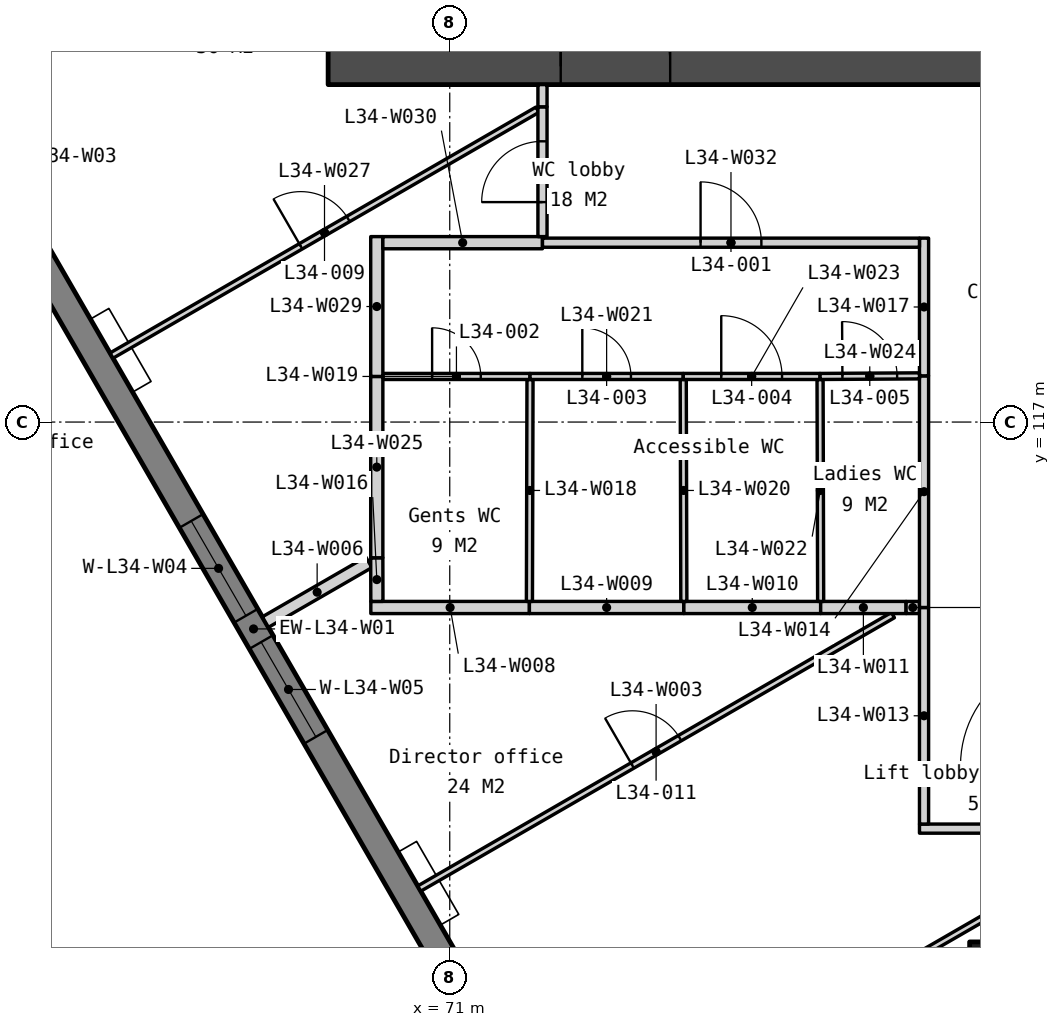
"""IFC4 building model, lengths in metres.
Left out: names, types, materials, properties, quantities, classifications, styles, units other than length and angle.
Written with IfcOpenShell. Run it as: python <this file> out.ifc"""

import sys

from ifc_helpers import new_model, si_unit, direction, frame, frame_2d, origin, origin_2d, place, context, subcontext, project, spatial, polyline, rectangle, outline, extrude, element, fill, save


model = new_model("IFC4")
c1 = context("Model", 3, precision=1e-05, world=origin(), true_north=direction((0.0, 1.0)))
c2 = subcontext(c1, "Body", "Model", "MODEL_VIEW")
j1 = project(units=[si_unit("LENGTHUNIT", "METRE"), si_unit("PLANEANGLEUNIT", "RADIAN")], contexts=[c1])
p1 = place(None, origin())
s1 = spatial("IfcSite", under=j1, at=p1, CompositionType="ELEMENT")
p2 = place(p1, origin())
s2 = spatial("IfcBuilding", under=s1, at=p2, CompositionType="ELEMENT")
p3 = place(p2, frame((0.0, 0.0, 136.4)))
s3 = spatial("IfcBuildingStorey", under=s2, at=p3, CompositionType="ELEMENT", Elevation=136.4)
p4 = place(p3, frame((80.0, 108.0, 0.0), z_axis=(0.0, 0.0, 1.0), x_axis=(1.0, 0.0, 0.0)))
e1 = element("IfcColumn", 1, at=p4, inside=s3, PredefinedType="COLUMN", context=c2, shape_type="SweptSolid", body=[
    extrude(rectangle(XDim=0.9, YDim=0.9, at=origin_2d()), origin(), (0.0, 0.0, 1.0), 3.9),
])
p5 = place(p3, frame((69.0, 122.85, 0.0), z_axis=(0.0, 0.0, 1.0), x_axis=(1.0, 0.0, 0.0)))
e2 = element("IfcWall", 2, at=p5, inside=s3, PredefinedType="SOLIDWALL", context=c2, shape_type="SweptSolid", body=[
    extrude(rectangle(XDim=22.0, YDim=0.6, at=frame_2d((11.0, 0.0))), origin(), (0.0, 0.0, 1.0), 3.75),
])
p6 = place(p5, frame((16.375, 0.0, 0.0)))
e3 = element("IfcOpeningElement", 3, at=p6, cuts=e2, PredefinedType="OPENING", context=c2, shape_type="SweptSolid", body=[
    extrude(rectangle(XDim=1.8, YDim=2.1, at=frame_2d((0.9, 1.05))), frame((0.0, 0.31, 0.0), z_axis=(0.0, -1.0, 0.0), x_axis=(1.0, 0.0, 0.0)), (0.0, 0.0, 1.0), 0.62),
])
p7 = place(p5, frame((3.825, 0.0, 0.0)))
e4 = element("IfcOpeningElement", 4, at=p7, cuts=e2, PredefinedType="OPENING", context=c2, shape_type="SweptSolid", body=[
    extrude(rectangle(XDim=1.8, YDim=2.1, at=frame_2d((0.9, 1.05))), frame((0.0, 0.31, 0.0), z_axis=(0.0, -1.0, 0.0), x_axis=(1.0, 0.0, 0.0)), (0.0, 0.0, 1.0), 0.62),
])
p8 = place(p5, frame((12.85, 0.0, 0.0)))
e5 = element("IfcOpeningElement", 5, at=p8, cuts=e2, PredefinedType="OPENING", context=c2, shape_type="SweptSolid", body=[
    extrude(rectangle(XDim=1.5, YDim=2.1, at=frame_2d((0.75, 1.05))), frame((0.0, 0.31, 0.0), z_axis=(0.0, -1.0, 0.0), x_axis=(1.0, 0.0, 0.0)), (0.0, 0.0, 1.0), 0.62),
])
p9 = place(p3, frame((57.652, 131.129, -0.15), z_axis=(0.0, 0.0, 1.0), x_axis=(0.499997369791, -0.866026922331, 0.0)))
e6 = element("IfcWall", 6, at=p9, inside=s3, PredefinedType="SOLIDWALL", context=c2, shape_type="SweptSolid", body=[
    extrude(outline(polyline([(40.486, 0.0), (40.486, 3.9), (0.0, 3.9), (0.0, 0.0), (40.486, 0.0)])), frame((0.0, 0.225, 0.0), z_axis=(0.0, -1.0, 0.0), x_axis=(1.0, 0.0, 0.0)), (0.0, 0.0, 1.0), 0.45),
])
p10 = place(p9, frame((0.87, 0.0, 0.95)))
e7 = element("IfcOpeningElement", 7, at=p10, cuts=e6, PredefinedType="OPENING", context=c2, shape_type="SweptSolid", body=[
    extrude(rectangle(XDim=1.2, YDim=2.2, at=frame_2d((0.6, 1.1))), frame((0.0, 0.235, 0.0), z_axis=(0.0, -1.0, 0.0), x_axis=(1.0, 0.0, 0.0)), (0.0, 0.0, 1.0), 0.47),
])
p11 = place(p9, frame((8.072, 0.0, 0.95)))
e8 = element("IfcOpeningElement", 8, at=p11, cuts=e6, PredefinedType="OPENING", context=c2, shape_type="SweptSolid", body=[
    extrude(rectangle(XDim=1.8, YDim=2.2, at=frame_2d((0.9, 1.1))), frame((0.0, 0.235, 0.0), z_axis=(0.0, -1.0, 0.0), x_axis=(1.0, 0.0, 0.0)), (0.0, 0.0, 1.0), 0.47),
])
p12 = place(p9, frame((10.372, 0.0, 0.95)))
e9 = element("IfcOpeningElement", 9, at=p12, cuts=e6, PredefinedType="OPENING", context=c2, shape_type="SweptSolid", body=[
    extrude(rectangle(XDim=1.8, YDim=2.2, at=frame_2d((0.9, 1.1))), frame((0.0, 0.235, 0.0), z_axis=(0.0, -1.0, 0.0), x_axis=(1.0, 0.0, 0.0)), (0.0, 0.0, 1.0), 0.47),
])
p13 = place(p9, frame((18.193, 0.0, 0.95)))
e10 = element("IfcOpeningElement", 10, at=p13, cuts=e6, PredefinedType="OPENING", context=c2, shape_type="SweptSolid", body=[
    extrude(rectangle(XDim=1.8, YDim=2.2, at=frame_2d((0.9, 1.1))), frame((0.0, 0.235, 0.0), z_axis=(0.0, -1.0, 0.0), x_axis=(1.0, 0.0, 0.0)), (0.0, 0.0, 1.0), 0.47),
])
p14 = place(p9, frame((20.493, 0.0, 0.95)))
e11 = element("IfcOpeningElement", 11, at=p14, cuts=e6, PredefinedType="OPENING", context=c2, shape_type="SweptSolid", body=[
    extrude(rectangle(XDim=1.8, YDim=2.2, at=frame_2d((0.9, 1.1))), frame((0.0, 0.235, 0.0), z_axis=(0.0, -1.0, 0.0), x_axis=(1.0, 0.0, 0.0)), (0.0, 0.0, 1.0), 0.47),
])
p15 = place(p9, frame((28.315, 0.0, 0.95)))
e12 = element("IfcOpeningElement", 12, at=p15, cuts=e6, PredefinedType="OPENING", context=c2, shape_type="SweptSolid", body=[
    extrude(rectangle(XDim=1.8, YDim=2.2, at=frame_2d((0.9, 1.1))), frame((0.0, 0.235, 0.0), z_axis=(0.0, -1.0, 0.0), x_axis=(1.0, 0.0, 0.0)), (0.0, 0.0, 1.0), 0.47),
])
p16 = place(p9, frame((30.615, 0.0, 0.95)))
e13 = element("IfcOpeningElement", 13, at=p16, cuts=e6, PredefinedType="OPENING", context=c2, shape_type="SweptSolid", body=[
    extrude(rectangle(XDim=1.8, YDim=2.2, at=frame_2d((0.9, 1.1))), frame((0.0, 0.235, 0.0), z_axis=(0.0, -1.0, 0.0), x_axis=(1.0, 0.0, 0.0)), (0.0, 0.0, 1.0), 0.47),
])
p17 = place(p9, frame((38.417, 0.0, 0.95)))
e14 = element("IfcOpeningElement", 14, at=p17, cuts=e6, PredefinedType="OPENING", context=c2, shape_type="SweptSolid", body=[
    extrude(rectangle(XDim=1.2, YDim=2.2, at=frame_2d((0.6, 1.1))), frame((0.0, 0.235, 0.0), z_axis=(0.0, -1.0, 0.0), x_axis=(1.0, 0.0, 0.0)), (0.0, 0.0, 1.0), 0.47),
])
p18 = place(p3, frame((73.029, 104.945, 0.0), z_axis=(0.0, 0.0, 1.0), x_axis=(0.866023222546, 0.500003777996, 0.0)))
e15 = element("IfcWall", 15, at=p18, inside=s3, PredefinedType="PARTITIONING", context=c2, shape_type="SweptSolid", body=[
    extrude(rectangle(XDim=7.963, YDim=0.1, at=frame_2d((3.981, 0.0))), origin(), (0.0, 0.0, 1.0), 3.75),
])
p19 = place(p3, frame((70.499, 109.327, 0.0), z_axis=(0.0, 0.0, 1.0), x_axis=(0.866019704065, 0.500009872074, 0.0)))
e16 = element("IfcWall", 16, at=p19, inside=s3, PredefinedType="PARTITIONING", context=c2, shape_type="SweptSolid", body=[
    extrude(rectangle(XDim=8.995, YDim=0.1, at=frame_2d((4.498, 0.0))), origin(), (0.0, 0.0, 1.0), 3.75),
])
p20 = place(p19, frame((4.048, 0.0, 0.0)))
e17 = element("IfcOpeningElement", 17, at=p20, cuts=e16, PredefinedType="OPENING", context=c2, shape_type="SweptSolid", body=[
    extrude(rectangle(XDim=0.9, YDim=2.1, at=frame_2d((0.45, 1.05))), frame((0.0, 0.06, 0.0), z_axis=(0.0, -1.0, 0.0), x_axis=(1.0, 0.0, 0.0)), (0.0, 0.0, 1.0), 0.12),
])
p21 = place(p3, frame((78.725, 110.313, 0.0), z_axis=(0.0, 0.0, 1.0), x_axis=(1.0, 0.0, 0.0)))
e18 = element("IfcWall", 18, at=p21, inside=s3, PredefinedType="PARTITIONING", context=c2, shape_type="SweptSolid", body=[
    extrude(rectangle(XDim=2.55, YDim=0.15, at=frame_2d((1.275, 0.0))), origin(), (0.0, 0.0, 1.0), 3.75),
])
p22 = place(p3, frame((67.968, 113.71, 0.0), z_axis=(0.0, 0.0, 1.0), x_axis=(0.866009734793, 0.500027138508, 0.0)))
e19 = element("IfcWall", 19, at=p22, inside=s3, PredefinedType="PARTITIONING", context=c2, shape_type="SweptSolid", body=[
    extrude(rectangle(XDim=1.965, YDim=0.2, at=frame_2d((0.983, 0.0))), origin(), (0.0, 0.0, 1.0), 3.75),
])
p23 = place(p3, frame((69.702, 113.95, 0.0), z_axis=(0.0, 0.0, 1.0), x_axis=(1.0, 0.0, 0.0)))
e20 = element("IfcWall", 20, at=p23, inside=s3, PredefinedType="PARTITIONING", context=c2, shape_type="SweptSolid", body=[
    extrude(rectangle(XDim=2.608, YDim=0.2, at=frame_2d((1.304, 0.0))), origin(), (0.0, 0.0, 1.0), 3.75),
])
p24 = place(p3, frame((72.31, 113.95, 0.0), z_axis=(0.0, 0.0, 1.0), x_axis=(1.0, 0.0, 0.0)))
e21 = element("IfcWall", 21, at=p24, inside=s3, PredefinedType="PARTITIONING", context=c2, shape_type="SweptSolid", body=[
    extrude(rectangle(XDim=2.54, YDim=0.2, at=frame_2d((1.27, 0.0))), origin(), (0.0, 0.0, 1.0), 3.75),
])
p25 = place(p3, frame((74.85, 113.95, 0.0), z_axis=(0.0, 0.0, 1.0), x_axis=(1.0, 0.0, 0.0)))
e22 = element("IfcWall", 22, at=p25, inside=s3, PredefinedType="PARTITIONING", context=c2, shape_type="SweptSolid", body=[
    extrude(rectangle(XDim=2.25, YDim=0.2, at=frame_2d((1.125, 0.0))), origin(), (0.0, 0.0, 1.0), 3.75),
])
p26 = place(p3, frame((77.1, 113.95, 0.0), z_axis=(0.0, 0.0, 1.0), x_axis=(1.0, 0.0, 0.0)))
e23 = element("IfcWall", 23, at=p26, inside=s3, PredefinedType="PARTITIONING", context=c2, shape_type="SweptSolid", body=[
    extrude(rectangle(XDim=1.405, YDim=0.2, at=frame_2d((0.702, 0.0))), origin(), (0.0, 0.0, 1.0), 3.75),
])
p27 = place(p3, frame((78.505, 113.95, 0.0), z_axis=(0.0, 0.0, 1.0), x_axis=(1.0, 0.0, 0.0)))
e24 = element("IfcWall", 24, at=p27, inside=s3, PredefinedType="PARTITIONING", context=c2, shape_type="SweptSolid", body=[
    extrude(rectangle(XDim=0.22, YDim=0.2, at=frame_2d((0.11, 0.0))), origin(), (0.0, 0.0, 1.0), 3.75),
])
p28 = place(p3, frame((78.8, 110.388, 0.0), z_axis=(0.0, 0.0, 1.0), x_axis=(0.0, 1.0, 0.0)))
e25 = element("IfcWall", 25, at=p28, inside=s3, PredefinedType="PARTITIONING", context=c2, shape_type="SweptSolid", body=[
    extrude(rectangle(XDim=3.562, YDim=0.15, at=frame_2d((1.781, 0.0))), origin(), (0.0, 0.0, 1.0), 3.75),
])
p29 = place(p3, frame((78.8, 113.95, 0.0), z_axis=(0.0, 0.0, 1.0), x_axis=(0.0, 1.0, 0.0)))
e26 = element("IfcWall", 26, at=p29, inside=s3, PredefinedType="PARTITIONING", context=c2, shape_type="SweptSolid", body=[
    extrude(rectangle(XDim=3.81, YDim=0.15, at=frame_2d((1.905, 0.0))), origin(), (0.0, 0.0, 1.0), 3.75),
])
p30 = place(p3, frame((69.802, 114.05, 0.0), z_axis=(0.0, 0.0, 1.0), x_axis=(-0.002380945632, 0.999997165545, 0.0)))
e27 = element("IfcWall", 27, at=p30, inside=s3, PredefinedType="PARTITIONING", context=c2, shape_type="SweptSolid", body=[
    extrude(rectangle(XDim=0.718, YDim=0.2, at=frame_2d((0.359, 0.0))), origin(), (0.0, 0.0, 1.0), 3.75),
])
p31 = place(p3, frame((78.8, 117.76, 0.0), z_axis=(0.0, 0.0, 1.0), x_axis=(0.0, 1.0, 0.0)))
e28 = element("IfcWall", 28, at=p31, inside=s3, PredefinedType="PARTITIONING", context=c2, shape_type="SweptSolid", body=[
    extrude(rectangle(XDim=2.265, YDim=0.15, at=frame_2d((1.132, 0.0))), origin(), (0.0, 0.0, 1.0), 3.75),
])
p32 = place(p3, frame((72.31, 114.05, 0.0), z_axis=(0.0, 0.0, 1.0), x_axis=(0.002608686776, 0.999996597371, 0.0)))
e29 = element("IfcWall", 29, at=p32, inside=s3, PredefinedType="PARTITIONING", context=c2, shape_type="SweptSolid", body=[
    extrude(rectangle(XDim=3.65, YDim=0.1, at=frame_2d((1.825, 0.0))), origin(), (0.0, 0.0, 1.0), 3.75),
])
p33 = place(p3, frame((69.9, 117.75, 0.0), z_axis=(0.0, 0.0, 1.0), x_axis=(1.0, 0.0, 0.0)))
e30 = element("IfcWall", 30, at=p33, inside=s3, PredefinedType="PARTITIONING", context=c2, shape_type="SweptSolid", body=[
    extrude(rectangle(XDim=2.42, YDim=0.1, at=frame_2d((1.21, 0.0))), origin(), (0.0, 0.0, 1.0), 3.75),
])
p34 = place(p33, frame((0.81, 0.0, 0.0)))
e31 = element("IfcOpeningElement", 31, at=p34, cuts=e30, PredefinedType="OPENING", context=c2, shape_type="SweptSolid", body=[
    extrude(rectangle(XDim=0.8, YDim=2.1, at=frame_2d((0.4, 1.05))), frame((0.0, 0.06, 0.0), z_axis=(0.0, -1.0, 0.0), x_axis=(1.0, 0.0, 0.0)), (0.0, 0.0, 1.0), 0.12),
])
p35 = place(p3, frame((74.85, 114.05, 0.0), z_axis=(0.0, 0.0, 1.0), x_axis=(-0.002675575707, 0.999996420641, 0.0)))
e32 = element("IfcWall", 32, at=p35, inside=s3, PredefinedType="PARTITIONING", context=c2, shape_type="SweptSolid", body=[
    extrude(rectangle(XDim=3.65, YDim=0.1, at=frame_2d((1.825, 0.0))), origin(), (0.0, 0.0, 1.0), 3.75),
])
p36 = place(p3, frame((72.32, 117.75, 0.0), z_axis=(0.0, 0.0, 1.0), x_axis=(1.0, 0.0, 0.0)))
e33 = element("IfcWall", 33, at=p36, inside=s3, PredefinedType="PARTITIONING", context=c2, shape_type="SweptSolid", body=[
    extrude(rectangle(XDim=2.52, YDim=0.1, at=frame_2d((1.26, 0.0))), origin(), (0.0, 0.0, 1.0), 3.75),
])
p37 = place(p36, frame((0.86, 0.0, 0.0)))
e34 = element("IfcOpeningElement", 34, at=p37, cuts=e33, PredefinedType="OPENING", context=c2, shape_type="SweptSolid", body=[
    extrude(rectangle(XDim=0.8, YDim=2.1, at=frame_2d((0.4, 1.05))), frame((0.0, 0.06, 0.0), z_axis=(0.0, -1.0, 0.0), x_axis=(1.0, 0.0, 0.0)), (0.0, 0.0, 1.0), 0.12),
])
p38 = place(p3, frame((77.1, 114.05, 0.0), z_axis=(0.0, 0.0, 1.0), x_axis=(-0.002675575707, 0.999996420641, 0.0)))
e35 = element("IfcWall", 35, at=p38, inside=s3, PredefinedType="PARTITIONING", context=c2, shape_type="SweptSolid", body=[
    extrude(rectangle(XDim=3.65, YDim=0.1, at=frame_2d((1.825, 0.0))), origin(), (0.0, 0.0, 1.0), 3.75),
])
p39 = place(p3, frame((74.84, 117.75, 0.0), z_axis=(0.0, 0.0, 1.0), x_axis=(1.0, 0.0, 0.0)))
e36 = element("IfcWall", 36, at=p39, inside=s3, PredefinedType="PARTITIONING", context=c2, shape_type="SweptSolid", body=[
    extrude(rectangle(XDim=2.25, YDim=0.1, at=frame_2d((1.125, 0.0))), origin(), (0.0, 0.0, 1.0), 3.75),
])
p40 = place(p39, frame((0.625, 0.0, 0.0)))
e37 = element("IfcOpeningElement", 37, at=p40, cuts=e36, PredefinedType="OPENING", context=c2, shape_type="SweptSolid", body=[
    extrude(rectangle(XDim=1.0, YDim=2.1, at=frame_2d((0.5, 1.05))), frame((0.0, 0.06, 0.0), z_axis=(0.0, -1.0, 0.0), x_axis=(1.0, 0.0, 0.0)), (0.0, 0.0, 1.0), 0.12),
])
p41 = place(p3, frame((77.09, 117.75, 0.0), z_axis=(0.0, 0.0, 1.0), x_axis=(0.999983043837, 0.005823404317, 0.0)))
e38 = element("IfcWall", 38, at=p41, inside=s3, PredefinedType="PARTITIONING", context=c2, shape_type="SweptSolid", body=[
    extrude(rectangle(XDim=1.635, YDim=0.1, at=frame_2d((0.817, 0.0))), origin(), (0.0, 0.0, 1.0), 3.75),
])
p42 = place(p41, frame((0.367, 0.0, 0.0)))
e39 = element("IfcOpeningElement", 39, at=p42, cuts=e38, PredefinedType="OPENING", context=c2, shape_type="SweptSolid", body=[
    extrude(rectangle(XDim=0.9, YDim=2.1, at=frame_2d((0.45, 1.05))), frame((0.0, 0.06, 0.0), z_axis=(0.0, -1.0, 0.0), x_axis=(1.0, 0.0, 0.0)), (0.0, 0.0, 1.0), 0.12),
])
p43 = place(p3, frame((69.8, 114.768, 0.0), z_axis=(0.0, 0.0, 1.0), x_axis=(0.0, 1.0, 0.0)))
e40 = element("IfcWall", 40, at=p43, inside=s3, PredefinedType="PARTITIONING", context=c2, shape_type="SweptSolid", body=[
    extrude(rectangle(XDim=2.982, YDim=0.2, at=frame_2d((1.491, 0.0))), origin(), (0.0, 0.0, 1.0), 3.75),
])
p44 = place(p3, frame((65.438, 118.093, 0.0), z_axis=(0.0, 0.0, 1.0), x_axis=(0.866029768103, 0.499992440702, 0.0)))
e41 = element("IfcWall", 41, at=p44, inside=s3, PredefinedType="PARTITIONING", context=c2, shape_type="SweptSolid", body=[
    extrude(rectangle(XDim=8.089, YDim=0.1, at=frame_2d((4.044, 0.0))), origin(), (0.0, 0.0, 1.0), 3.75),
])
p45 = place(p44, frame((3.594, 0.0, 0.0)))
e42 = element("IfcOpeningElement", 42, at=p45, cuts=e41, PredefinedType="OPENING", context=c2, shape_type="SweptSolid", body=[
    extrude(rectangle(XDim=0.9, YDim=2.1, at=frame_2d((0.45, 1.05))), frame((0.0, 0.06, 0.0), z_axis=(0.0, -1.0, 0.0), x_axis=(1.0, 0.0, 0.0)), (0.0, 0.0, 1.0), 0.12),
])
p46 = place(p3, frame((69.8, 117.75, 0.0), z_axis=(0.0, 0.0, 1.0), x_axis=(0.0, 1.0, 0.0)))
e43 = element("IfcWall", 43, at=p46, inside=s3, PredefinedType="PARTITIONING", context=c2, shape_type="SweptSolid", body=[
    extrude(rectangle(XDim=2.3, YDim=0.2, at=frame_2d((1.15, 0.0))), origin(), (0.0, 0.0, 1.0), 3.75),
])
p47 = place(p3, frame((69.9, 119.95, 0.0), z_axis=(0.0, 0.0, 1.0), x_axis=(1.0, 0.0, 0.0)))
e44 = element("IfcWall", 44, at=p47, inside=s3, PredefinedType="PARTITIONING", context=c2, shape_type="SweptSolid", body=[
    extrude(rectangle(XDim=2.625, YDim=0.2, at=frame_2d((1.312, 0.0))), origin(), (0.0, 0.0, 1.0), 3.75),
])
p48 = place(p3, frame((72.525, 120.05, 0.0), z_axis=(0.0, 0.0, 1.0), x_axis=(0.0, 1.0, 0.0)))
e45 = element("IfcWall", 45, at=p48, inside=s3, PredefinedType="PARTITIONING", context=c2, shape_type="SweptSolid", body=[
    extrude(rectangle(XDim=2.135, YDim=0.15, at=frame_2d((1.067, 0.0))), origin(), (0.0, 0.0, 1.0), 3.75),
])
p49 = place(p48, frame((0.567, 0.0, 0.0)))
e46 = element("IfcOpeningElement", 46, at=p49, cuts=e45, PredefinedType="OPENING", context=c2, shape_type="SweptSolid", body=[
    extrude(rectangle(XDim=1.0, YDim=2.1, at=frame_2d((0.5, 1.05))), frame((0.0, 0.085, 0.0), z_axis=(0.0, -1.0, 0.0), x_axis=(1.0, 0.0, 0.0)), (0.0, 0.0, 1.0), 0.17),
])
p50 = place(p3, frame((72.525, 119.95, 0.0), z_axis=(0.0, 0.0, 1.0), x_axis=(1.0, 0.0, 0.0)))
e47 = element("IfcWall", 47, at=p50, inside=s3, PredefinedType="PARTITIONING", context=c2, shape_type="SweptSolid", body=[
    extrude(rectangle(XDim=6.2, YDim=0.15, at=frame_2d((3.1, 0.0))), origin(), (0.0, 0.0, 1.0), 3.75),
])
p51 = place(p50, frame((2.6, 0.0, 0.0)))
e48 = element("IfcOpeningElement", 48, at=p51, cuts=e47, PredefinedType="OPENING", context=c2, shape_type="SweptSolid", body=[
    extrude(rectangle(XDim=1.0, YDim=2.1, at=frame_2d((0.5, 1.05))), frame((0.0, 0.085, 0.0), z_axis=(0.0, -1.0, 0.0), x_axis=(1.0, 0.0, 0.0)), (0.0, 0.0, 1.0), 0.17),
])
p52 = place(p3, frame((72.525, 122.185, 0.0), z_axis=(0.0, 0.0, 1.0), x_axis=(0.0, 1.0, 0.0)))
e49 = element("IfcWall", 49, at=p52, inside=s3, PredefinedType="PARTITIONING", context=c2, shape_type="SweptSolid", body=[
    extrude(rectangle(XDim=0.365, YDim=0.15, at=frame_2d((0.183, 0.0))), origin(), (0.0, 0.0, 1.0), 3.75),
])
p53 = place(p3, frame((62.907, 122.476, 0.0), z_axis=(0.0, 0.0, 1.0), x_axis=(0.866028145587, 0.499995251029, 0.0)))
e50 = element("IfcWall", 50, at=p53, inside=s3, PredefinedType="PARTITIONING", context=c2, shape_type="SweptSolid", body=[
    extrude(rectangle(XDim=4.726, YDim=0.1, at=frame_2d((2.363, 0.0))), origin(), (0.0, 0.0, 1.0), 3.75),
])
p54 = place(p7, origin())
e51 = element("IfcDoor", 51, at=p54, inside=s3, OperationType="DOUBLE_DOOR_DOUBLE_SWING", PredefinedType="DOOR", context=c2, shape_type="SweptSolid", body=[
    extrude(rectangle(XDim=1.8, YDim=2.1, at=frame_2d((0.9, 1.05))), frame((0.0, 0.025, 0.0), z_axis=(0.0, -1.0, 0.0), x_axis=(1.0, 0.0, 0.0)), (0.0, 0.0, 1.0), 0.05),
])
fill(e4, e51)
p55 = place(p13, origin())
e52 = element("IfcWindow", 52, at=p55, inside=s3, PartitioningType="SINGLE_PANEL", PredefinedType="WINDOW", context=c2, shape_type="SweptSolid", body=[
    extrude(rectangle(XDim=1.8, YDim=2.2, at=frame_2d((0.9, 1.1))), frame((0.0, 0.03, 0.0), z_axis=(0.0, -1.0, 0.0), x_axis=(1.0, 0.0, 0.0)), (0.0, 0.0, 1.0), 0.06),
])
fill(e10, e52)
p56 = place(p14, origin())
e53 = element("IfcWindow", 53, at=p56, inside=s3, PartitioningType="SINGLE_PANEL", PredefinedType="WINDOW", context=c2, shape_type="SweptSolid", body=[
    extrude(rectangle(XDim=1.8, YDim=2.2, at=frame_2d((0.9, 1.1))), frame((0.0, 0.03, 0.0), z_axis=(0.0, -1.0, 0.0), x_axis=(1.0, 0.0, 0.0)), (0.0, 0.0, 1.0), 0.06),
])
fill(e11, e53)
p57 = place(p51, origin())
e54 = element("IfcDoor", 54, at=p57, inside=s3, OperationType="SINGLE_SWING_LEFT", PredefinedType="DOOR", context=c2, shape_type="SweptSolid", body=[
    extrude(rectangle(XDim=1.0, YDim=2.1, at=frame_2d((0.5, 1.05))), frame((0.0, 0.025, 0.0), z_axis=(0.0, -1.0, 0.0), x_axis=(1.0, 0.0, 0.0)), (0.0, 0.0, 1.0), 0.05),
])
fill(e48, e54)
p58 = place(p34, origin())
e55 = element("IfcDoor", 55, at=p58, inside=s3, OperationType="SINGLE_SWING_LEFT", PredefinedType="DOOR", context=c2, shape_type="SweptSolid", body=[
    extrude(rectangle(XDim=0.8, YDim=2.1, at=frame_2d((0.4, 1.05))), frame((0.0, 0.025, 0.0), z_axis=(0.0, -1.0, 0.0), x_axis=(1.0, 0.0, 0.0)), (0.0, 0.0, 1.0), 0.05),
])
fill(e31, e55)
p59 = place(p37, origin())
e56 = element("IfcDoor", 56, at=p59, inside=s3, OperationType="SINGLE_SWING_LEFT", PredefinedType="DOOR", context=c2, shape_type="SweptSolid", body=[
    extrude(rectangle(XDim=0.8, YDim=2.1, at=frame_2d((0.4, 1.05))), frame((0.0, 0.025, 0.0), z_axis=(0.0, -1.0, 0.0), x_axis=(1.0, 0.0, 0.0)), (0.0, 0.0, 1.0), 0.05),
])
fill(e34, e56)
p60 = place(p40, origin())
e57 = element("IfcDoor", 57, at=p60, inside=s3, OperationType="SINGLE_SWING_LEFT", PredefinedType="DOOR", context=c2, shape_type="SweptSolid", body=[
    extrude(rectangle(XDim=1.0, YDim=2.1, at=frame_2d((0.5, 1.05))), frame((0.0, 0.025, 0.0), z_axis=(0.0, -1.0, 0.0), x_axis=(1.0, 0.0, 0.0)), (0.0, 0.0, 1.0), 0.05),
])
fill(e37, e57)
p61 = place(p42, origin())
e58 = element("IfcDoor", 58, at=p61, inside=s3, OperationType="SINGLE_SWING_LEFT", PredefinedType="DOOR", context=c2, shape_type="SweptSolid", body=[
    extrude(rectangle(XDim=0.9, YDim=2.1, at=frame_2d((0.45, 1.05))), frame((0.0, 0.025, 0.0), z_axis=(0.0, -1.0, 0.0), x_axis=(1.0, 0.0, 0.0)), (0.0, 0.0, 1.0), 0.05),
])
fill(e39, e58)
p62 = place(p45, origin())
e59 = element("IfcDoor", 59, at=p62, inside=s3, OperationType="SINGLE_SWING_LEFT", PredefinedType="DOOR", context=c2, shape_type="SweptSolid", body=[
    extrude(rectangle(XDim=0.9, YDim=2.1, at=frame_2d((0.45, 1.05))), frame((0.0, 0.025, 0.0), z_axis=(0.0, -1.0, 0.0), x_axis=(1.0, 0.0, 0.0)), (0.0, 0.0, 1.0), 0.05),
])
fill(e42, e59)
p63 = place(p49, origin())
e60 = element("IfcDoor", 60, at=p63, inside=s3, OperationType="SINGLE_SWING_LEFT", PredefinedType="DOOR", context=c2, shape_type="SweptSolid", body=[
    extrude(rectangle(XDim=1.0, YDim=2.1, at=frame_2d((0.5, 1.05))), frame((0.0, 0.025, 0.0), z_axis=(0.0, -1.0, 0.0), x_axis=(1.0, 0.0, 0.0)), (0.0, 0.0, 1.0), 0.05),
])
fill(e46, e60)
p64 = place(p20, origin())
e61 = element("IfcDoor", 61, at=p64, inside=s3, OperationType="SINGLE_SWING_LEFT", PredefinedType="DOOR", context=c2, shape_type="SweptSolid", body=[
    extrude(rectangle(XDim=0.9, YDim=2.1, at=frame_2d((0.45, 1.05))), frame((0.0, 0.025, 0.0), z_axis=(0.0, -1.0, 0.0), x_axis=(1.0, 0.0, 0.0)), (0.0, 0.0, 1.0), 0.05),
])
fill(e17, e61)
save(model, sys.argv[1])
